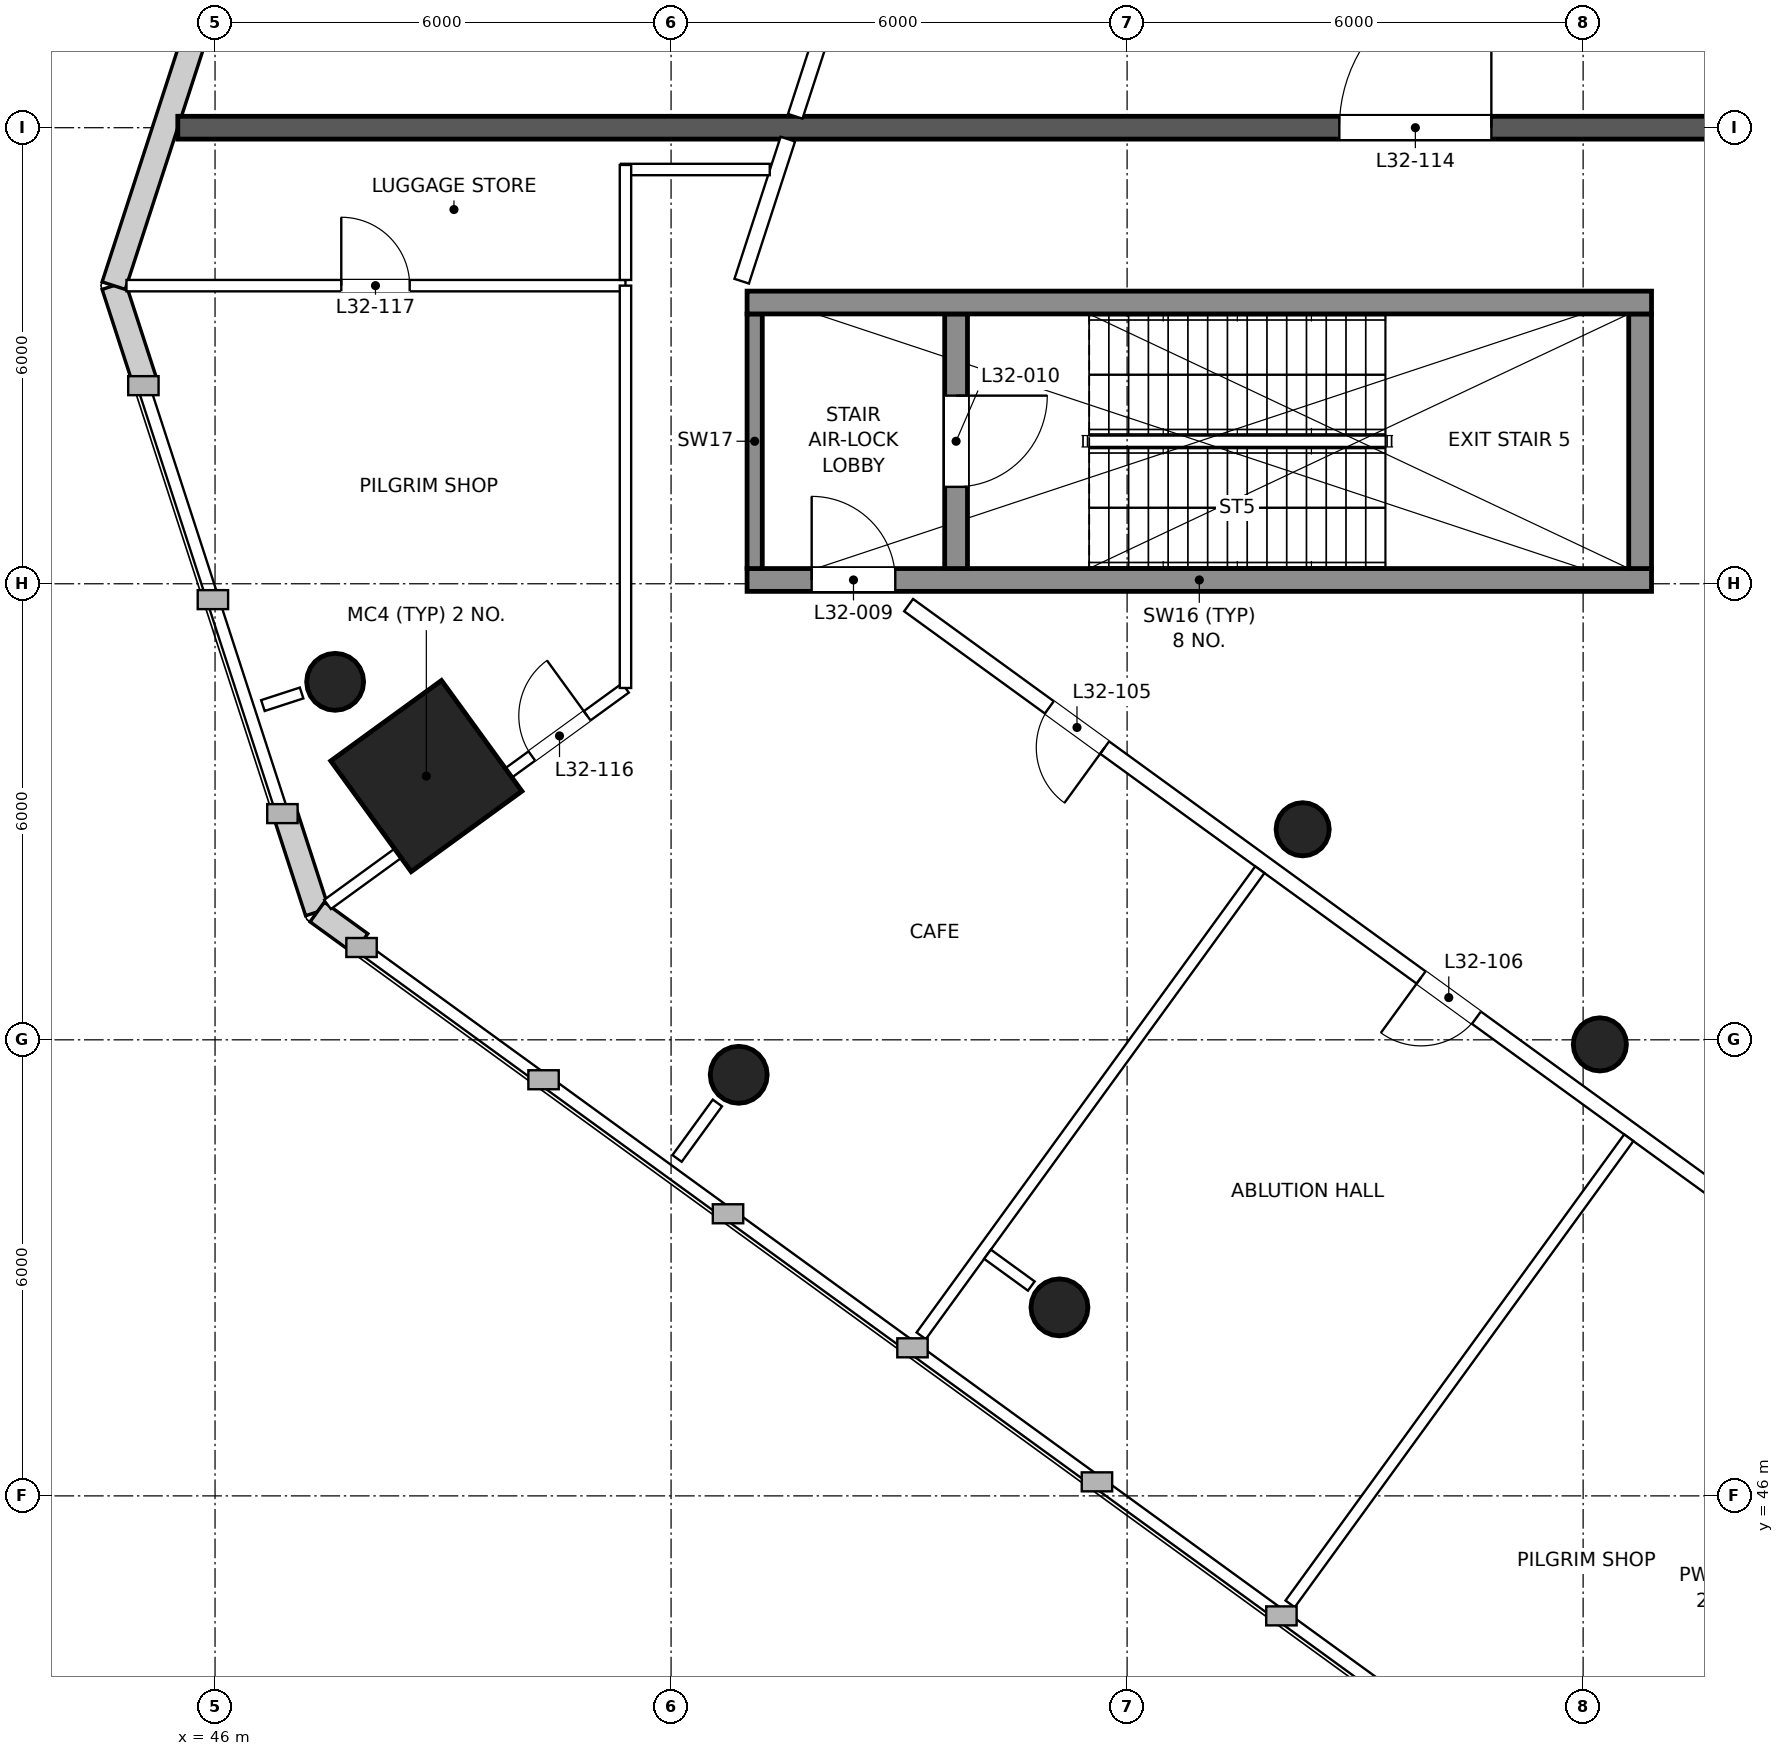
"""IFC4 building model, lengths in metres.
Left out: names, types, materials, properties, quantities, classifications, styles, units other than length and angle.
Written with IfcOpenShell. Run it as: python <this file> out.ifc"""

import sys

from ifc_helpers import new_model, si_unit, direction, frame, frame_2d, origin, origin_2d, place, context, subcontext, project, spatial, rectangle, circle, extrude, element, fill, save


model = new_model("IFC4")
c1 = context("Model", 3, precision=1e-05, world=origin(), true_north=direction((0.0, 1.0)))
c2 = subcontext(c1, "Body", "Model", "MODEL_VIEW")
j1 = project(units=[si_unit("LENGTHUNIT", "METRE"), si_unit("PLANEANGLEUNIT", "RADIAN")], contexts=[c1])
p1 = place(None, origin())
s1 = spatial("IfcSite", under=j1, at=p1, CompositionType="ELEMENT")
p2 = place(p1, origin())
s2 = spatial("IfcBuilding", under=s1, at=p2, CompositionType="ELEMENT")
p3 = place(p2, frame((0.0, 0.0, 142.6)))
s3 = spatial("IfcBuildingStorey", under=s2, at=p3, CompositionType="ELEMENT", Elevation=142.6)
p4 = place(p3, frame((47.58, 56.71, 0.0), z_axis=(0.0, 0.0, 1.0), x_axis=(1.0, 0.0, 0.0)))
e1 = element("IfcColumn", 1, at=p4, inside=s3, PredefinedType="COLUMN", context=c2, shape_type="SweptSolid", body=[
    extrude(circle(Radius=0.375, at=origin_2d()), origin(), (0.0, 0.0, 1.0), 6.0),
])
p5 = place(p3, frame((48.78, 55.47, 0.0), z_axis=(0.0, 0.0, 1.0), x_axis=(-0.809016994375, -0.587785252292, 0.0)))
e2 = element("IfcColumn", 2, at=p5, inside=s3, PredefinedType="COLUMN", context=c2, shape_type="SweptSolid", body=[
    extrude(rectangle(XDim=1.8, YDim=1.8, at=origin_2d()), origin(), (0.0, 0.0, 1.0), 6.0),
])
for number, where, z_axis, x_axis in (
    (3, (52.89, 51.54, 0.0), (0.0, 0.0, 1.0), (1.0, 0.0, 0.0)),
    (4, (57.11, 48.48, 0.0), (0.0, 0.0, 1.0), (1.0, 0.0, 0.0)),
):
    element("IfcColumn", number, at=place(p3, frame(where, z_axis=z_axis, x_axis=x_axis)), inside=s3, PredefinedType="COLUMN", context=c2, shape_type="SweptSolid", body=[
        extrude(circle(Radius=0.375, at=origin_2d()), origin(), (0.0, 0.0, 1.0), 6.0),
    ])
for number, where, z_axis, x_axis in (
    (5, (60.31, 54.77, 0.0), (0.0, 0.0, 1.0), (1.0, 0.0, 0.0)),
    (6, (64.22, 51.94, 0.0), (0.0, 0.0, 1.0), (1.0, 0.0, 0.0)),
):
    element("IfcColumn", number, at=place(p3, frame(where, z_axis=z_axis, x_axis=x_axis)), inside=s3, PredefinedType="COLUMN", context=c2, shape_type="SweptSolid", body=[
        extrude(circle(Radius=0.35, at=origin_2d()), origin(), (0.0, 0.0, 1.0), 6.0),
    ])
p6 = place(p3, frame((44.667, 61.922, 0.0), z_axis=(0.0, 0.0, 1.0), x_axis=(0.309015617768, -0.951056963581, 0.0)))
e7 = element("IfcWall", 7, at=p6, inside=s3, PredefinedType="SOLIDWALL", context=c2, shape_type="SweptSolid", body=[
    extrude(rectangle(XDim=1.332, YDim=0.32, at=frame_2d((0.666, 0.0))), origin(), (0.0, 0.0, 1.0), 5.7),
])
p7 = place(p3, frame((46.932, 54.949, 0.0), z_axis=(0.0, 0.0, 1.0), x_axis=(0.308961761269, -0.951074460846, 0.0)))
e8 = element("IfcWall", 8, at=p7, inside=s3, PredefinedType="SOLIDWALL", context=c2, shape_type="SweptSolid", body=[
    extrude(rectangle(XDim=1.332, YDim=0.32, at=frame_2d((0.666, 0.0))), origin(), (0.0, 0.0, 1.0), 5.7),
])
p8 = place(p3, frame((47.344, 53.682, 0.0), z_axis=(0.0, 0.0, 1.0), x_axis=(0.809064470568, -0.587719901369, 0.0)))
e9 = element("IfcWall", 9, at=p8, inside=s3, PredefinedType="SOLIDWALL", context=c2, shape_type="SweptSolid", body=[
    extrude(rectangle(XDim=0.707, YDim=0.32, at=frame_2d((0.354, 0.0))), origin(), (0.0, 0.0, 1.0), 5.7),
])
p9 = place(p3, frame((46.169, 66.546, 0.0), z_axis=(0.0, 0.0, 1.0), x_axis=(-0.309003189113, -0.951061001786, 0.0)))
e10 = element("IfcWall", 10, at=p9, inside=s3, PredefinedType="SOLIDWALL", context=c2, shape_type="SweptSolid", body=[
    extrude(rectangle(XDim=4.862, YDim=0.32, at=frame_2d((2.431, 0.0))), origin(), (0.0, 0.0, 1.0), 5.7),
])
p10 = place(p3, frame((53.0, 58.05, 0.0), z_axis=(0.0, 0.0, 1.0), x_axis=(1.0, 0.0, 0.0)))
e11 = element("IfcWall", 11, at=p10, inside=s3, PredefinedType="SHEAR", context=c2, shape_type="SweptSolid", body=[
    extrude(rectangle(XDim=11.9, YDim=0.3, at=frame_2d((5.95, 0.0))), origin(), (0.0, 0.0, 1.0), 6.0),
])
p11 = place(p10, frame((0.85, 0.0, 0.0)))
e12 = element("IfcOpeningElement", 12, at=p11, cuts=e11, PredefinedType="OPENING", context=c2, shape_type="SweptSolid", body=[
    extrude(rectangle(XDim=1.1, YDim=2.1, at=frame_2d((0.55, 1.05))), frame((0.0, 0.16, 0.0), z_axis=(0.0, -1.0, 0.0), x_axis=(1.0, 0.0, 0.0)), (0.0, 0.0, 1.0), 0.32),
])
p12 = place(p3, frame((53.1, 58.2, 0.0), z_axis=(0.0, 0.0, 1.0), x_axis=(0.0, 1.0, 0.0)))
e13 = element("IfcWall", 13, at=p12, inside=s3, PredefinedType="SHEAR", context=c2, shape_type="SweptSolid", body=[
    extrude(rectangle(XDim=3.35, YDim=0.2, at=frame_2d((1.675, 0.0))), origin(), (0.0, 0.0, 1.0), 6.0),
])
p13 = place(p3, frame((55.75, 58.2, 0.0), z_axis=(0.0, 0.0, 1.0), x_axis=(0.0, 1.0, 0.0)))
e14 = element("IfcWall", 14, at=p13, inside=s3, PredefinedType="SHEAR", context=c2, shape_type="SweptSolid", body=[
    extrude(rectangle(XDim=3.35, YDim=0.3, at=frame_2d((1.675, 0.0))), origin(), (0.0, 0.0, 1.0), 6.0),
])
p14 = place(p13, frame((1.075, 0.0, 0.0)))
e15 = element("IfcOpeningElement", 15, at=p14, cuts=e14, PredefinedType="OPENING", context=c2, shape_type="SweptSolid", body=[
    extrude(rectangle(XDim=1.2, YDim=2.1, at=frame_2d((0.6, 1.05))), frame((0.0, 0.16, 0.0), z_axis=(0.0, -1.0, 0.0), x_axis=(1.0, 0.0, 0.0)), (0.0, 0.0, 1.0), 0.32),
])
p15 = place(p3, frame((64.75, 58.2, 0.0), z_axis=(0.0, 0.0, 1.0), x_axis=(0.0, 1.0, 0.0)))
e16 = element("IfcWall", 16, at=p15, inside=s3, PredefinedType="SHEAR", context=c2, shape_type="SweptSolid", body=[
    extrude(rectangle(XDim=3.35, YDim=0.3, at=frame_2d((1.675, 0.0))), origin(), (0.0, 0.0, 1.0), 6.0),
])
p16 = place(p3, frame((53.0, 61.7, 0.0), z_axis=(0.0, 0.0, 1.0), x_axis=(1.0, 0.0, 0.0)))
e17 = element("IfcWall", 17, at=p16, inside=s3, PredefinedType="SHEAR", context=c2, shape_type="SweptSolid", body=[
    extrude(rectangle(XDim=11.9, YDim=0.3, at=frame_2d((5.95, 0.0))), origin(), (0.0, 0.0, 1.0), 6.0),
])
p17 = place(p3, frame((45.51, 64.0, 0.0), z_axis=(0.0, 0.0, 1.0), x_axis=(1.0, 0.0, 0.0)))
e18 = element("IfcWall", 18, at=p17, inside=s3, PredefinedType="PARTITIONING", context=c2, shape_type="SweptSolid", body=[
    extrude(rectangle(XDim=48.98, YDim=0.3, at=frame_2d((24.49, 0.0))), origin(), (0.0, 0.0, 1.0), 5.0),
])
p18 = place(p17, frame((15.283, 0.0, 0.0)))
e19 = element("IfcOpeningElement", 19, at=p18, cuts=e18, PredefinedType="OPENING", context=c2, shape_type="SweptSolid", body=[
    extrude(rectangle(XDim=2.0, YDim=2.1, at=frame_2d((1.0, 1.05))), frame((0.0, 0.16, 0.0), z_axis=(0.0, -1.0, 0.0), x_axis=(1.0, 0.0, 0.0)), (0.0, 0.0, 1.0), 0.32),
])
p19 = place(p17, frame((31.698, 0.0, 0.0)))
e20 = element("IfcOpeningElement", 20, at=p19, cuts=e18, PredefinedType="OPENING", context=c2, shape_type="SweptSolid", body=[
    extrude(rectangle(XDim=2.0, YDim=2.1, at=frame_2d((1.0, 1.05))), frame((0.0, 0.16, 0.0), z_axis=(0.0, -1.0, 0.0), x_axis=(1.0, 0.0, 0.0)), (0.0, 0.0, 1.0), 0.32),
])
p20 = place(p3, frame((67.998, 48.367, 0.0), z_axis=(0.0, 0.0, 1.0), x_axis=(-0.80902196565, 0.587778409858, 0.0)))
e21 = element("IfcWall", 21, at=p20, inside=s3, PredefinedType="PARTITIONING", context=c2, shape_type="SweptSolid", body=[
    extrude(rectangle(XDim=15.911, YDim=0.2, at=frame_2d((7.956, 0.0))), origin(), (0.0, 0.0, 1.0), 5.0),
])
p21 = place(p20, frame((12.723, 0.0, 0.0)))
e22 = element("IfcOpeningElement", 22, at=p21, cuts=e21, PredefinedType="OPENING", context=c2, shape_type="SweptSolid", body=[
    extrude(rectangle(XDim=0.9, YDim=2.1, at=frame_2d((0.45, 1.05))), frame((0.0, 0.11, 0.0), z_axis=(0.0, -1.0, 0.0), x_axis=(1.0, 0.0, 0.0)), (0.0, 0.0, 1.0), 0.22),
])
p22 = place(p20, frame((6.677, 0.0, 0.0)))
e23 = element("IfcOpeningElement", 23, at=p22, cuts=e21, PredefinedType="OPENING", context=c2, shape_type="SweptSolid", body=[
    extrude(rectangle(XDim=0.9, YDim=2.1, at=frame_2d((0.45, 1.05))), frame((0.0, 0.11, 0.0), z_axis=(0.0, -1.0, 0.0), x_axis=(1.0, 0.0, 0.0)), (0.0, 0.0, 1.0), 0.22),
])
p23 = place(p20, frame((1.597, 0.0, 0.0)))
e24 = element("IfcOpeningElement", 24, at=p23, cuts=e21, PredefinedType="OPENING", context=c2, shape_type="SweptSolid", body=[
    extrude(rectangle(XDim=0.9, YDim=2.1, at=frame_2d((0.45, 1.05))), frame((0.0, 0.11, 0.0), z_axis=(0.0, -1.0, 0.0), x_axis=(1.0, 0.0, 0.0)), (0.0, 0.0, 1.0), 0.22),
])
p24 = place(p3, frame((52.929, 61.981, 0.0), z_axis=(0.0, 0.0, 1.0), x_axis=(0.308951238916, 0.951077879026, 0.0)))
e25 = element("IfcWall", 25, at=p24, inside=s3, PredefinedType="PARTITIONING", context=c2, shape_type="SweptSolid", body=[
    extrude(rectangle(XDim=1.965, YDim=0.2, at=frame_2d((0.983, 0.0))), origin(), (0.0, 0.0, 1.0), 5.7),
])
p25 = place(p3, frame((53.634, 64.15, 0.0), z_axis=(0.0, 0.0, 1.0), x_axis=(0.309008133723, 0.95105939525, 0.0)))
e26 = element("IfcWall", 26, at=p25, inside=s3, PredefinedType="PARTITIONING", context=c2, shape_type="SweptSolid", body=[
    extrude(rectangle(XDim=10.554, YDim=0.2, at=frame_2d((5.277, 0.0))), origin(), (0.0, 0.0, 1.0), 5.15),
])
p26 = place(p25, frame((8.521, 0.0, 0.0)))
e27 = element("IfcOpeningElement", 27, at=p26, cuts=e26, PredefinedType="OPENING", context=c2, shape_type="SweptSolid", body=[
    extrude(rectangle(XDim=0.9, YDim=2.1, at=frame_2d((0.45, 1.05))), frame((0.0, 0.11, 0.0), z_axis=(0.0, -1.0, 0.0), x_axis=(1.0, 0.0, 0.0)), (0.0, 0.0, 1.0), 0.22),
])
p27 = place(p25, frame((2.786, 0.0, 0.0)))
e28 = element("IfcOpeningElement", 28, at=p27, cuts=e26, PredefinedType="OPENING", context=c2, shape_type="SweptSolid", body=[
    extrude(rectangle(XDim=0.9, YDim=2.1, at=frame_2d((0.45, 1.05))), frame((0.0, 0.11, 0.0), z_axis=(0.0, -1.0, 0.0), x_axis=(1.0, 0.0, 0.0)), (0.0, 0.0, 1.0), 0.22),
])
p28 = place(p3, frame((44.835, 61.922, 0.0), z_axis=(0.0, 0.0, 1.0), x_axis=(1.0, 0.0, 0.0)))
e29 = element("IfcWall", 29, at=p28, inside=s3, PredefinedType="PARTITIONING", context=c2, shape_type="SweptSolid", body=[
    extrude(rectangle(XDim=6.565, YDim=0.15, at=frame_2d((3.283, 0.0))), origin(), (0.0, 0.0, 1.0), 5.0),
])
p29 = place(p28, frame((2.826, 0.0, 0.0)))
e30 = element("IfcOpeningElement", 30, at=p29, cuts=e29, PredefinedType="OPENING", context=c2, shape_type="SweptSolid", body=[
    extrude(rectangle(XDim=0.9, YDim=2.1, at=frame_2d((0.45, 1.05))), frame((0.0, 0.085, 0.0), z_axis=(0.0, -1.0, 0.0), x_axis=(1.0, 0.0, 0.0)), (0.0, 0.0, 1.0), 0.17),
])
p30 = place(p3, frame((47.48, 53.781, 0.0), z_axis=(0.0, 0.0, 1.0), x_axis=(0.809025783817, 0.587773154473, 0.0)))
e31 = element("IfcWall", 31, at=p30, inside=s3, PredefinedType="PARTITIONING", context=c2, shape_type="SweptSolid", body=[
    extrude(rectangle(XDim=4.845, YDim=0.15, at=frame_2d((2.423, 0.0))), origin(), (0.0, 0.0, 1.0), 5.7),
])
p31 = place(p30, frame((3.323, 0.0, 0.0)))
e32 = element("IfcOpeningElement", 32, at=p31, cuts=e31, PredefinedType="OPENING", context=c2, shape_type="SweptSolid", body=[
    extrude(rectangle(XDim=0.9, YDim=2.1, at=frame_2d((0.45, 1.05))), frame((0.0, 0.085, 0.0), z_axis=(0.0, -1.0, 0.0), x_axis=(1.0, 0.0, 0.0)), (0.0, 0.0, 1.0), 0.17),
])
p32 = place(p3, frame((65.529, 40.667, 0.0), z_axis=(0.0, 0.0, 1.0), x_axis=(0.309004544659, 0.951060561363, 0.0)))
e33 = element("IfcWall", 33, at=p32, inside=s3, PredefinedType="PARTITIONING", context=c2, shape_type="SweptSolid", body=[
    extrude(rectangle(XDim=7.99, YDim=0.15, at=frame_2d((3.995, 0.0))), origin(), (0.0, 0.0, 1.0), 5.7),
])
p33 = place(p3, frame((55.291, 48.106, 0.0), z_axis=(0.0, 0.0, 1.0), x_axis=(0.587779028788, 0.809021515979, 0.0)))
e34 = element("IfcWall", 34, at=p33, inside=s3, PredefinedType="PARTITIONING", context=c2, shape_type="SweptSolid", body=[
    extrude(rectangle(XDim=7.58, YDim=0.15, at=frame_2d((3.79, 0.0))), origin(), (0.0, 0.0, 1.0), 5.0),
])
p34 = place(p3, frame((60.145, 44.579, 0.0), z_axis=(0.0, 0.0, 1.0), x_axis=(0.587800109381, 0.80900619986, 0.0)))
e35 = element("IfcWall", 35, at=p34, inside=s3, PredefinedType="PARTITIONING", context=c2, shape_type="SweptSolid", body=[
    extrude(rectangle(XDim=7.58, YDim=0.15, at=frame_2d((3.79, 0.0))), origin(), (0.0, 0.0, 1.0), 5.7),
])
p35 = place(p3, frame((47.139, 56.563, 0.0), z_axis=(0.0, 0.0, 1.0), x_axis=(-0.950983778631, -0.309240768303, 0.0)))
e36 = element("IfcWall", 36, at=p35, inside=s3, PredefinedType="PARTITIONING", context=c2, shape_type="SweptSolid", body=[
    extrude(rectangle(XDim=0.535, YDim=0.15, at=frame_2d((0.268, 0.0))), origin(), (0.0, 0.0, 1.0), 5.7),
])
p36 = place(p3, frame((52.609, 51.169, 0.0), z_axis=(0.0, 0.0, 1.0), x_axis=(-0.587721110922, -0.809063591924, 0.0)))
e37 = element("IfcWall", 37, at=p36, inside=s3, PredefinedType="PARTITIONING", context=c2, shape_type="SweptSolid", body=[
    extrude(rectangle(XDim=0.902, YDim=0.15, at=frame_2d((0.451, 0.0))), origin(), (0.0, 0.0, 1.0), 5.7),
])
p37 = place(p3, frame((56.74, 48.761, 0.0), z_axis=(0.0, 0.0, 1.0), x_axis=(-0.809002940562, 0.58780459522, 0.0)))
e38 = element("IfcWall", 38, at=p37, inside=s3, PredefinedType="PARTITIONING", context=c2, shape_type="SweptSolid", body=[
    extrude(rectangle(XDim=0.712, YDim=0.15, at=frame_2d((0.356, 0.0))), origin(), (0.0, 0.0, 1.0), 5.25),
])
p38 = place(p3, frame((51.4, 61.922, 0.0), z_axis=(0.0, 0.0, 1.0), x_axis=(0.0, -1.0, 0.0)))
e39 = element("IfcWall", 39, at=p38, inside=s3, PredefinedType="PARTITIONING", context=c2, shape_type="SweptSolid", body=[
    extrude(rectangle(XDim=5.293, YDim=0.15, at=frame_2d((2.646, 0.0))), origin(), (0.0, 0.0, 1.0), 5.7),
])
p39 = place(p3, frame((53.298, 63.45, 0.0), z_axis=(0.0, 0.0, 1.0), x_axis=(-1.0, 0.0, 0.0)))
e40 = element("IfcWall", 40, at=p39, inside=s3, PredefinedType="PARTITIONING", context=c2, shape_type="SweptSolid", body=[
    extrude(rectangle(XDim=1.958, YDim=0.15, at=frame_2d((0.979, 0.0))), origin(), (0.0, 0.0, 1.0), 5.7),
])
p40 = place(p3, frame((51.4, 63.51, 0.0), z_axis=(0.0, 0.0, 1.0), x_axis=(0.0, -1.0, 0.0)))
e41 = element("IfcWall", 41, at=p40, inside=s3, PredefinedType="PARTITIONING", context=c2, shape_type="SweptSolid", body=[
    extrude(rectangle(XDim=1.513, YDim=0.15, at=frame_2d((0.756, 0.0))), origin(), (0.0, 0.0, 1.0), 5.7),
])
p41 = place(p11, origin())
e42 = element("IfcDoor", 42, at=p41, inside=s3, OperationType="SINGLE_SWING_LEFT", PredefinedType="DOOR", context=c2, shape_type="SweptSolid", body=[
    extrude(rectangle(XDim=1.1, YDim=2.1, at=frame_2d((0.55, 1.05))), frame((0.0, 0.025, 0.0), z_axis=(0.0, -1.0, 0.0), x_axis=(1.0, 0.0, 0.0)), (0.0, 0.0, 1.0), 0.05),
])
fill(e12, e42)
p42 = place(p14, frame((1.2, 0.0, 0.0), z_axis=(0.0, 0.0, 1.0), x_axis=(-1.0, 0.0, 0.0)))
e43 = element("IfcDoor", 43, at=p42, inside=s3, OperationType="SINGLE_SWING_LEFT", PredefinedType="DOOR", context=c2, shape_type="SweptSolid", body=[
    extrude(rectangle(XDim=1.2, YDim=2.1, at=frame_2d((0.6, 1.05))), frame((0.0, 0.025, 0.0), z_axis=(0.0, -1.0, 0.0), x_axis=(1.0, 0.0, 0.0)), (0.0, 0.0, 1.0), 0.05),
])
fill(e15, e43)
p43 = place(p21, origin())
e44 = element("IfcDoor", 44, at=p43, inside=s3, OperationType="SINGLE_SWING_LEFT", PredefinedType="DOOR", context=c2, shape_type="SweptSolid", body=[
    extrude(rectangle(XDim=0.9, YDim=2.1, at=frame_2d((0.45, 1.05))), frame((0.0, 0.025, 0.0), z_axis=(0.0, -1.0, 0.0), x_axis=(1.0, 0.0, 0.0)), (0.0, 0.0, 1.0), 0.05),
])
fill(e22, e44)
p44 = place(p22, origin())
e45 = element("IfcDoor", 45, at=p44, inside=s3, OperationType="SINGLE_SWING_RIGHT", PredefinedType="DOOR", context=c2, shape_type="SweptSolid", body=[
    extrude(rectangle(XDim=0.9, YDim=2.1, at=frame_2d((0.45, 1.05))), frame((0.0, 0.025, 0.0), z_axis=(0.0, -1.0, 0.0), x_axis=(1.0, 0.0, 0.0)), (0.0, 0.0, 1.0), 0.05),
])
fill(e23, e45)
p45 = place(p18, origin())
e46 = element("IfcDoor", 46, at=p45, inside=s3, OperationType="DOUBLE_DOOR_SINGLE_SWING", PredefinedType="DOOR", context=c2, shape_type="SweptSolid", body=[
    extrude(rectangle(XDim=2.0, YDim=2.1, at=frame_2d((1.0, 1.05))), frame((0.0, 0.025, 0.0), z_axis=(0.0, -1.0, 0.0), x_axis=(1.0, 0.0, 0.0)), (0.0, 0.0, 1.0), 0.05),
])
fill(e19, e46)
p46 = place(p31, origin())
e47 = element("IfcDoor", 47, at=p46, inside=s3, OperationType="SINGLE_SWING_RIGHT", PredefinedType="DOOR", context=c2, shape_type="SweptSolid", body=[
    extrude(rectangle(XDim=0.9, YDim=2.1, at=frame_2d((0.45, 1.05))), frame((0.0, 0.025, 0.0), z_axis=(0.0, -1.0, 0.0), x_axis=(1.0, 0.0, 0.0)), (0.0, 0.0, 1.0), 0.05),
])
fill(e32, e47)
p47 = place(p29, origin())
e48 = element("IfcDoor", 48, at=p47, inside=s3, OperationType="SINGLE_SWING_LEFT", PredefinedType="DOOR", context=c2, shape_type="SweptSolid", body=[
    extrude(rectangle(XDim=0.9, YDim=2.1, at=frame_2d((0.45, 1.05))), frame((0.0, 0.025, 0.0), z_axis=(0.0, -1.0, 0.0), x_axis=(1.0, 0.0, 0.0)), (0.0, 0.0, 1.0), 0.05),
])
fill(e30, e48)
save(model, sys.argv[1])
